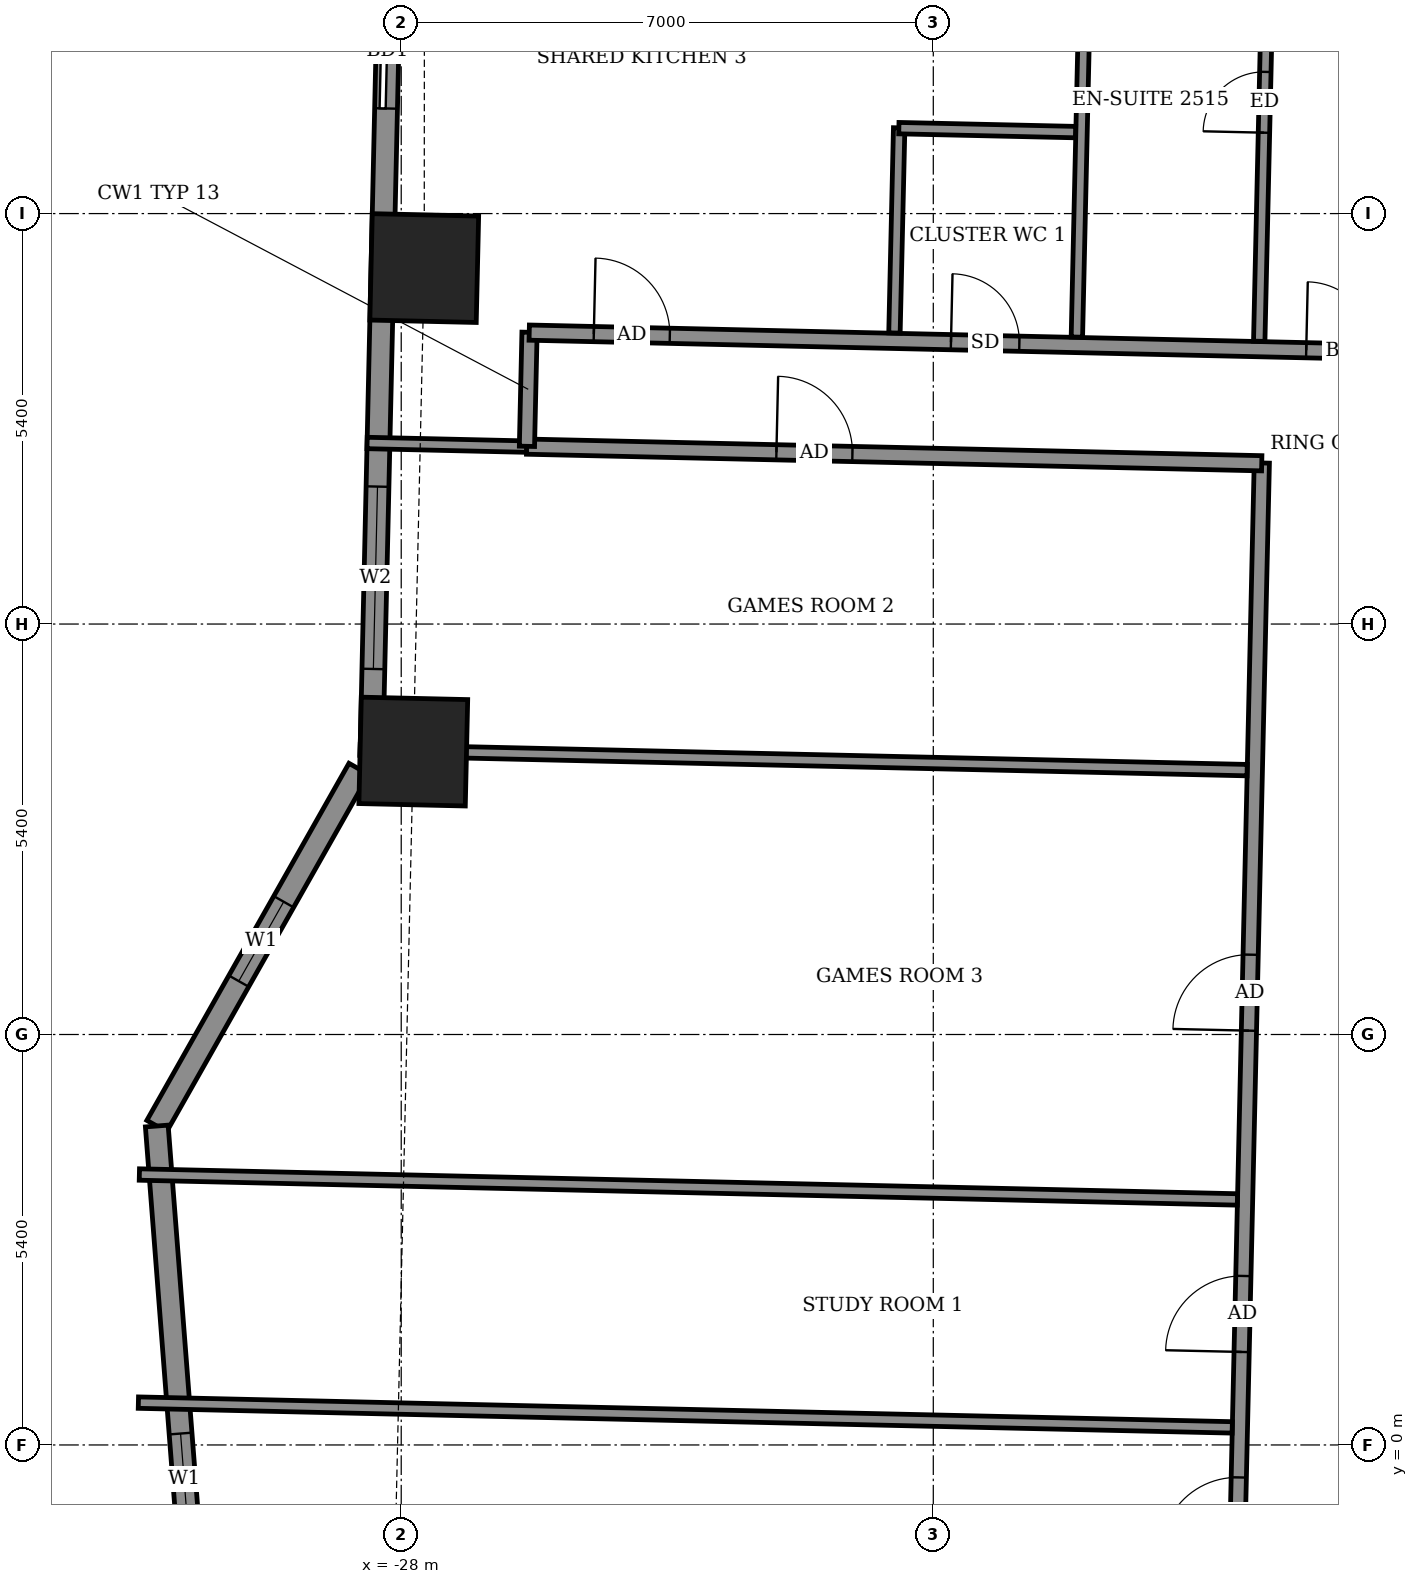
"""IFC4 building model, lengths in metres.
Left out: names, types, materials, properties, quantities, classifications, styles, units other than length and angle.
Written with IfcOpenShell. Run it as: python <this file> out.ifc"""

import sys

from ifc_helpers import new_model, si_unit, direction, frame, frame_2d, origin, origin_2d, place, context, subcontext, project, spatial, rectangle, extrude, element, fill, save


model = new_model("IFC4")
c1 = context("Model", 3, precision=1e-05, world=origin(), true_north=direction((0.0, 1.0)))
c2 = subcontext(c1, "Body", "Model", "MODEL_VIEW")
j1 = project(units=[si_unit("LENGTHUNIT", "METRE"), si_unit("PLANEANGLEUNIT", "RADIAN")], contexts=[c1])
p1 = place(None, origin())
s1 = spatial("IfcSite", under=j1, at=p1, CompositionType="ELEMENT")
p2 = place(p1, origin())
s2 = spatial("IfcBuilding", under=s1, at=p2, CompositionType="ELEMENT")
p3 = place(p2, frame((0.0, 0.0, 101.9)))
s3 = spatial("IfcBuildingStorey", under=s2, at=p3, CompositionType="ELEMENT", Elevation=101.9)
for number, where, z_axis, x_axis in (
    (1, (-27.697, 15.483, -0.55), (0.0, 0.0, 1.0), (-0.023, -1.0, 0.0)),
    (2, (-27.841, 9.122, -0.55), (0.0, 0.0, 1.0), (-0.023, -1.0, 0.0)),
):
    element("IfcColumn", number, at=place(p3, frame(where, z_axis=z_axis, x_axis=x_axis)), inside=s3, PredefinedType="COLUMN", context=c2, shape_type="SweptSolid", body=[
        extrude(rectangle(XDim=1.4, YDim=1.4, at=origin_2d()), origin(), (0.0, 0.0, 1.0), 3.6),
    ])
p4 = place(p3, frame((-28.106, 21.707, 0.0), z_axis=(0.0, 0.0, 1.0), x_axis=(-0.022654663697, -0.999743350172, 0.0)))
e3 = element("IfcWall", 3, at=p4, inside=s3, PredefinedType="SOLIDWALL", context=c2, shape_type="SweptSolid", body=[
    extrude(rectangle(XDim=12.63, YDim=0.3, at=frame_2d((6.315, 0.0))), origin(), (0.0, 0.0, 1.0), 3.05),
])
p5 = place(p4, frame((2.625, 0.0, 0.0)))
e4 = element("IfcOpeningElement", 4, at=p5, cuts=e3, PredefinedType="OPENING", context=c2, shape_type="SweptSolid", body=[
    extrude(rectangle(XDim=1.5, YDim=2.4, at=frame_2d((0.75, 1.2))), frame((0.0, 0.16, 0.0), z_axis=(0.0, -1.0, 0.0), x_axis=(1.0, 0.0, 0.0)), (0.0, 0.0, 1.0), 0.32),
])
p6 = place(p4, frame((9.101, 0.0, 0.9)))
e5 = element("IfcOpeningElement", 5, at=p6, cuts=e3, PredefinedType="OPENING", context=c2, shape_type="SweptSolid", body=[
    extrude(rectangle(XDim=2.4, YDim=1.5, at=frame_2d((1.2, 0.75))), frame((0.0, 0.16, 0.0), z_axis=(0.0, -1.0, 0.0), x_axis=(1.0, 0.0, 0.0)), (0.0, 0.0, 1.0), 0.32),
])
p7 = place(p3, frame((-28.557, 8.894, 0.0), z_axis=(0.0, 0.0, 1.0), x_axis=(-0.492589172415, -0.8702619762, 0.0)))
e6 = element("IfcWall", 6, at=p7, inside=s3, PredefinedType="SOLIDWALL", context=c2, shape_type="SweptSolid", body=[
    extrude(rectangle(XDim=5.398, YDim=0.3, at=frame_2d((2.699, 0.0))), origin(), (0.0, 0.0, 1.0), 3.05),
])
p8 = place(p7, frame((2.008, 0.0, 0.9)))
e7 = element("IfcOpeningElement", 7, at=p8, cuts=e6, PredefinedType="OPENING", context=c2, shape_type="SweptSolid", body=[
    extrude(rectangle(XDim=1.2, YDim=1.5, at=frame_2d((0.6, 0.75))), frame((0.0, 0.16, 0.0), z_axis=(0.0, -1.0, 0.0), x_axis=(1.0, 0.0, 0.0)), (0.0, 0.0, 1.0), 0.32),
])
p9 = place(p3, frame((-31.216, 4.196, 0.0), z_axis=(0.0, 0.0, 1.0), x_axis=(0.077178825362, -0.997017266107, 0.0)))
e8 = element("IfcWall", 8, at=p9, inside=s3, PredefinedType="SOLIDWALL", context=c2, shape_type="SweptSolid", body=[
    extrude(rectangle(XDim=5.574, YDim=0.3, at=frame_2d((2.787, 0.0))), origin(), (0.0, 0.0, 1.0), 3.05),
])
p10 = place(p9, frame((4.058, 0.0, 0.9)))
e9 = element("IfcOpeningElement", 9, at=p10, cuts=e8, PredefinedType="OPENING", context=c2, shape_type="SweptSolid", body=[
    extrude(rectangle(XDim=1.2, YDim=1.5, at=frame_2d((0.6, 0.75))), frame((0.0, 0.16, 0.0), z_axis=(0.0, -1.0, 0.0), x_axis=(1.0, 0.0, 0.0)), (0.0, 0.0, 1.0), 0.32),
])
p11 = place(p3, frame((-31.15, 9.448, 0.0), z_axis=(0.0, 0.0, 1.0), x_axis=(0.022681332769, 0.999742745482, 0.0)))
e10 = element("IfcWall", 10, at=p11, inside=s3, PredefinedType="USERDEFINED", context=c2, shape_type="SweptSolid", body=[
    extrude(rectangle(XDim=3.875, YDim=0.55, at=frame_2d((1.938, 0.0))), origin(), (0.0, 0.0, 1.0), 0.8),
])
p12 = place(p3, frame((-17.247, -12.149, 0.0), z_axis=(0.0, 0.0, 1.0), x_axis=(0.022696191528, 0.999742408268, 0.0)))
e11 = element("IfcWall", 11, at=p12, inside=s3, PredefinedType="PARTITIONING", context=c2, shape_type="SweptSolid", body=[
    extrude(rectangle(XDim=25.074, YDim=0.2, at=frame_2d((12.537, 0.0))), origin(), (0.0, 0.0, 1.0), 3.05),
])
p13 = place(p12, frame((17.604, 0.0, 0.0)))
e12 = element("IfcOpeningElement", 12, at=p13, cuts=e11, PredefinedType="OPENING", context=c2, shape_type="SweptSolid", body=[
    extrude(rectangle(XDim=1.0, YDim=2.1, at=frame_2d((0.5, 1.05))), frame((0.0, 0.11, 0.0), z_axis=(0.0, -1.0, 0.0), x_axis=(1.0, 0.0, 0.0)), (0.0, 0.0, 1.0), 0.22),
])
p14 = place(p12, frame((13.376, 0.0, 0.0)))
e13 = element("IfcOpeningElement", 13, at=p14, cuts=e11, PredefinedType="OPENING", context=c2, shape_type="SweptSolid", body=[
    extrude(rectangle(XDim=1.0, YDim=2.1, at=frame_2d((0.5, 1.05))), frame((0.0, 0.11, 0.0), z_axis=(0.0, -1.0, 0.0), x_axis=(1.0, 0.0, 0.0)), (0.0, 0.0, 1.0), 0.22),
])
p15 = place(p12, frame((10.725, 0.0, 0.0)))
e14 = element("IfcOpeningElement", 14, at=p15, cuts=e11, PredefinedType="OPENING", context=c2, shape_type="SweptSolid", body=[
    extrude(rectangle(XDim=1.0, YDim=2.1, at=frame_2d((0.5, 1.05))), frame((0.0, 0.11, 0.0), z_axis=(0.0, -1.0, 0.0), x_axis=(1.0, 0.0, 0.0)), (0.0, 0.0, 1.0), 0.22),
])
p16 = place(p12, frame((8.225, 0.0, 0.0)))
e15 = element("IfcOpeningElement", 15, at=p16, cuts=e11, PredefinedType="OPENING", context=c2, shape_type="SweptSolid", body=[
    extrude(rectangle(XDim=0.9, YDim=2.1, at=frame_2d((0.45, 1.05))), frame((0.0, 0.11, 0.0), z_axis=(0.0, -1.0, 0.0), x_axis=(1.0, 0.0, 0.0)), (0.0, 0.0, 1.0), 0.22),
])
p17 = place(p12, frame((5.262, 0.0, 0.0)))
e16 = element("IfcOpeningElement", 16, at=p17, cuts=e11, PredefinedType="OPENING", context=c2, shape_type="SweptSolid", body=[
    extrude(rectangle(XDim=1.0, YDim=2.1, at=frame_2d((0.5, 1.05))), frame((0.0, 0.11, 0.0), z_axis=(0.0, -1.0, 0.0), x_axis=(1.0, 0.0, 0.0)), (0.0, 0.0, 1.0), 0.22),
])
p18 = place(p3, frame((-31.458, 0.557, 0.0), z_axis=(0.0, 0.0, 1.0), x_axis=(0.999743636126, -0.022642041092, 0.0)))
e17 = element("IfcWall", 17, at=p18, inside=s3, PredefinedType="PARTITIONING", context=c2, shape_type="SweptSolid", body=[
    extrude(rectangle(XDim=14.395, YDim=0.15, at=frame_2d((7.197, 0.0))), origin(), (0.0, 0.0, 1.0), 2.1),
])
p19 = place(p3, frame((-31.445, 3.558, 0.0), z_axis=(0.0, 0.0, 1.0), x_axis=(0.999742140748, -0.022707972439, 0.0)))
e18 = element("IfcWall", 18, at=p19, inside=s3, PredefinedType="PARTITIONING", context=c2, shape_type="SweptSolid", body=[
    extrude(rectangle(XDim=14.45, YDim=0.15, at=frame_2d((7.225, 0.0))), origin(), (0.0, 0.0, 1.0), 2.1),
])
p20 = place(p3, frame((-28.541, 9.143, 0.0), z_axis=(0.0, 0.0, 1.0), x_axis=(0.999742008279, -0.022713803786, 0.0)))
e19 = element("IfcWall", 19, at=p20, inside=s3, PredefinedType="PARTITIONING", context=c2, shape_type="SweptSolid", body=[
    extrude(rectangle(XDim=11.673, YDim=0.15, at=frame_2d((5.836, 0.0))), origin(), (0.0, 0.0, 1.0), 3.05),
])
p21 = place(p3, frame((-28.449, 13.182, 0.0), z_axis=(0.0, 0.0, 1.0), x_axis=(0.999741236023, -0.022747769011, 0.0)))
e20 = element("IfcWall", 20, at=p21, inside=s3, PredefinedType="PARTITIONING", context=c2, shape_type="SweptSolid", body=[
    extrude(rectangle(XDim=2.104, YDim=0.15, at=frame_2d((1.052, 0.0))), origin(), (0.0, 0.0, 1.0), 2.55),
])
p22 = place(p3, frame((-26.35, 13.134, 0.0), z_axis=(0.0, 0.0, 1.0), x_axis=(0.999743721339, -0.022638278294, 0.0)))
e21 = element("IfcWall", 21, at=p22, inside=s3, PredefinedType="PARTITIONING", context=c2, shape_type="SweptSolid", body=[
    extrude(rectangle(XDim=9.674, YDim=0.2, at=frame_2d((4.837, 0.0))), origin(), (0.0, 0.0, 1.0), 3.05),
])
p23 = place(p22, frame((3.287, 0.0, 0.0)))
e22 = element("IfcOpeningElement", 22, at=p23, cuts=e21, PredefinedType="OPENING", context=c2, shape_type="SweptSolid", body=[
    extrude(rectangle(XDim=1.0, YDim=2.1, at=frame_2d((0.5, 1.05))), frame((0.0, 0.11, 0.0), z_axis=(0.0, -1.0, 0.0), x_axis=(1.0, 0.0, 0.0)), (0.0, 0.0, 1.0), 0.22),
])
p24 = place(p3, frame((-26.346, 13.138, 0.0), z_axis=(0.0, 0.0, 1.0), x_axis=(0.022617910375, 0.999744182344, 0.0)))
e23 = element("IfcWall", 23, at=p24, inside=s3, PredefinedType="PARTITIONING", context=c2, shape_type="SweptSolid", body=[
    extrude(rectangle(XDim=1.5, YDim=0.2, at=frame_2d((0.75, 0.0))), origin(), (0.0, 0.0, 1.0), 3.05),
])
p25 = place(p3, frame((-26.316, 14.634, 0.0), z_axis=(0.0, 0.0, 1.0), x_axis=(0.999742734556, -0.02268181435, 0.0)))
e24 = element("IfcWall", 24, at=p25, inside=s3, PredefinedType="PARTITIONING", context=c2, shape_type="SweptSolid", body=[
    extrude(rectangle(XDim=50.708, YDim=0.2, at=frame_2d((25.354, 0.0))), origin(), (0.0, 0.0, 1.0), 3.05),
])
p26 = place(p25, frame((48.229, 0.0, 0.0)))
e25 = element("IfcOpeningElement", 25, at=p26, cuts=e24, PredefinedType="OPENING", context=c2, shape_type="SweptSolid", body=[
    extrude(rectangle(XDim=1.0, YDim=2.1, at=frame_2d((0.5, 1.05))), frame((0.0, 0.11, 0.0), z_axis=(0.0, -1.0, 0.0), x_axis=(1.0, 0.0, 0.0)), (0.0, 0.0, 1.0), 0.22),
])
p27 = place(p25, frame((43.6, 0.0, 0.0)))
e26 = element("IfcOpeningElement", 26, at=p27, cuts=e24, PredefinedType="OPENING", context=c2, shape_type="SweptSolid", body=[
    extrude(rectangle(XDim=0.9, YDim=2.1, at=frame_2d((0.45, 1.05))), frame((0.0, 0.11, 0.0), z_axis=(0.0, -1.0, 0.0), x_axis=(1.0, 0.0, 0.0)), (0.0, 0.0, 1.0), 0.22),
])
p28 = place(p25, frame((38.925, 0.0, 0.0)))
e27 = element("IfcOpeningElement", 27, at=p28, cuts=e24, PredefinedType="OPENING", context=c2, shape_type="SweptSolid", body=[
    extrude(rectangle(XDim=0.9, YDim=2.1, at=frame_2d((0.45, 1.05))), frame((0.0, 0.11, 0.0), z_axis=(0.0, -1.0, 0.0), x_axis=(1.0, 0.0, 0.0)), (0.0, 0.0, 1.0), 0.22),
])
p29 = place(p25, frame((36.9, 0.0, 0.0)))
e28 = element("IfcOpeningElement", 28, at=p29, cuts=e24, PredefinedType="OPENING", context=c2, shape_type="SweptSolid", body=[
    extrude(rectangle(XDim=0.9, YDim=2.1, at=frame_2d((0.45, 1.05))), frame((0.0, 0.11, 0.0), z_axis=(0.0, -1.0, 0.0), x_axis=(1.0, 0.0, 0.0)), (0.0, 0.0, 1.0), 0.22),
])
p30 = place(p25, frame((29.975, 0.0, 0.0)))
e29 = element("IfcOpeningElement", 29, at=p30, cuts=e24, PredefinedType="OPENING", context=c2, shape_type="SweptSolid", body=[
    extrude(rectangle(XDim=0.9, YDim=2.1, at=frame_2d((0.45, 1.05))), frame((0.0, 0.11, 0.0), z_axis=(0.0, -1.0, 0.0), x_axis=(1.0, 0.0, 0.0)), (0.0, 0.0, 1.0), 0.22),
])
p31 = place(p25, frame((27.9, 0.0, 0.0)))
e30 = element("IfcOpeningElement", 30, at=p31, cuts=e24, PredefinedType="OPENING", context=c2, shape_type="SweptSolid", body=[
    extrude(rectangle(XDim=0.9, YDim=2.1, at=frame_2d((0.45, 1.05))), frame((0.0, 0.11, 0.0), z_axis=(0.0, -1.0, 0.0), x_axis=(1.0, 0.0, 0.0)), (0.0, 0.0, 1.0), 0.22),
])
p32 = place(p25, frame((21.175, 0.0, 0.0)))
e31 = element("IfcOpeningElement", 31, at=p32, cuts=e24, PredefinedType="OPENING", context=c2, shape_type="SweptSolid", body=[
    extrude(rectangle(XDim=0.9, YDim=2.1, at=frame_2d((0.45, 1.05))), frame((0.0, 0.11, 0.0), z_axis=(0.0, -1.0, 0.0), x_axis=(1.0, 0.0, 0.0)), (0.0, 0.0, 1.0), 0.22),
])
p33 = place(p25, frame((19.25, 0.0, 0.0)))
e32 = element("IfcOpeningElement", 32, at=p33, cuts=e24, PredefinedType="OPENING", context=c2, shape_type="SweptSolid", body=[
    extrude(rectangle(XDim=0.9, YDim=2.1, at=frame_2d((0.45, 1.05))), frame((0.0, 0.11, 0.0), z_axis=(0.0, -1.0, 0.0), x_axis=(1.0, 0.0, 0.0)), (0.0, 0.0, 1.0), 0.22),
])
p34 = place(p25, frame((12.375, 0.0, 0.0)))
e33 = element("IfcOpeningElement", 33, at=p34, cuts=e24, PredefinedType="OPENING", context=c2, shape_type="SweptSolid", body=[
    extrude(rectangle(XDim=0.9, YDim=2.1, at=frame_2d((0.45, 1.05))), frame((0.0, 0.11, 0.0), z_axis=(0.0, -1.0, 0.0), x_axis=(1.0, 0.0, 0.0)), (0.0, 0.0, 1.0), 0.22),
])
p35 = place(p25, frame((10.225, 0.0, 0.0)))
e34 = element("IfcOpeningElement", 34, at=p35, cuts=e24, PredefinedType="OPENING", context=c2, shape_type="SweptSolid", body=[
    extrude(rectangle(XDim=0.9, YDim=2.1, at=frame_2d((0.45, 1.05))), frame((0.0, 0.11, 0.0), z_axis=(0.0, -1.0, 0.0), x_axis=(1.0, 0.0, 0.0)), (0.0, 0.0, 1.0), 0.22),
])
p36 = place(p25, frame((0.85, 0.0, 0.0)))
e35 = element("IfcOpeningElement", 35, at=p36, cuts=e24, PredefinedType="OPENING", context=c2, shape_type="SweptSolid", body=[
    extrude(rectangle(XDim=1.0, YDim=2.1, at=frame_2d((0.5, 1.05))), frame((0.0, 0.11, 0.0), z_axis=(0.0, -1.0, 0.0), x_axis=(1.0, 0.0, 0.0)), (0.0, 0.0, 1.0), 0.22),
])
p37 = place(p25, frame((5.55, 0.0, 0.0)))
e36 = element("IfcOpeningElement", 36, at=p37, cuts=e24, PredefinedType="OPENING", context=c2, shape_type="SweptSolid", body=[
    extrude(rectangle(XDim=0.9, YDim=2.1, at=frame_2d((0.45, 1.05))), frame((0.0, 0.11, 0.0), z_axis=(0.0, -1.0, 0.0), x_axis=(1.0, 0.0, 0.0)), (0.0, 0.0, 1.0), 0.22),
])
p38 = place(p3, frame((-21.511, 14.629, 0.0), z_axis=(0.0, 0.0, 1.0), x_axis=(0.022969966847, 0.999736155505, 0.0)))
e37 = element("IfcWall", 37, at=p38, inside=s3, PredefinedType="PARTITIONING", context=c2, shape_type="SweptSolid", body=[
    extrude(rectangle(XDim=2.7, YDim=0.15, at=frame_2d((1.35, 0.0))), origin(), (0.0, 0.0, 1.0), 3.05),
])
p39 = place(p3, frame((-19.111, 14.575, 0.0), z_axis=(0.0, 0.0, 1.0), x_axis=(0.022684355347, 0.999742676904, 0.0)))
e38 = element("IfcWall", 38, at=p39, inside=s3, PredefinedType="PARTITIONING", context=c2, shape_type="SweptSolid", body=[
    extrude(rectangle(XDim=11.376, YDim=0.15, at=frame_2d((5.688, 0.0))), origin(), (0.0, 0.0, 1.0), 2.55),
])
p40 = place(p3, frame((-16.712, 14.52, 0.0), z_axis=(0.0, 0.0, 1.0), x_axis=(0.022692767652, 0.999742485991, 0.0)))
e39 = element("IfcWall", 39, at=p40, inside=s3, PredefinedType="PARTITIONING", context=c2, shape_type="SweptSolid", body=[
    extrude(rectangle(XDim=6.391, YDim=0.15, at=frame_2d((3.195, 0.0))), origin(), (0.0, 0.0, 1.0), 3.05),
])
p41 = place(p40, frame((2.745, 0.0, 0.0)))
e40 = element("IfcOpeningElement", 40, at=p41, cuts=e39, PredefinedType="OPENING", context=c2, shape_type="SweptSolid", body=[
    extrude(rectangle(XDim=0.8, YDim=2.1, at=frame_2d((0.4, 1.05))), frame((0.0, 0.085, 0.0), z_axis=(0.0, -1.0, 0.0), x_axis=(1.0, 0.0, 0.0)), (0.0, 0.0, 1.0), 0.17),
])
p42 = place(p3, frame((-21.453, 17.324, 0.0), z_axis=(0.0, 0.0, 1.0), x_axis=(0.999749744571, -0.022370700241, 0.0)))
e41 = element("IfcWall", 41, at=p42, inside=s3, PredefinedType="PARTITIONING", context=c2, shape_type="SweptSolid", body=[
    extrude(rectangle(XDim=2.324, YDim=0.15, at=frame_2d((1.162, 0.0))), origin(), (0.0, 0.0, 1.0), 3.05),
])
p43 = place(p5, origin())
e42 = element("IfcDoor", 42, at=p43, inside=s3, OperationType="SLIDING_TO_LEFT", PredefinedType="DOOR", context=c2, shape_type="SweptSolid", body=[
    extrude(rectangle(XDim=1.5, YDim=2.4, at=frame_2d((0.75, 1.2))), frame((0.0, 0.025, 0.0), z_axis=(0.0, -1.0, 0.0), x_axis=(1.0, 0.0, 0.0)), (0.0, 0.0, 1.0), 0.05),
])
fill(e4, e42)
p44 = place(p6, origin())
e43 = element("IfcWindow", 43, at=p44, inside=s3, PartitioningType="DOUBLE_PANEL_VERTICAL", PredefinedType="WINDOW", context=c2, shape_type="SweptSolid", body=[
    extrude(rectangle(XDim=2.4, YDim=1.5, at=frame_2d((1.2, 0.75))), frame((0.0, 0.03, 0.0), z_axis=(0.0, -1.0, 0.0), x_axis=(1.0, 0.0, 0.0)), (0.0, 0.0, 1.0), 0.06),
])
fill(e5, e43)
p45 = place(p8, origin())
e44 = element("IfcWindow", 44, at=p45, inside=s3, PartitioningType="SINGLE_PANEL", PredefinedType="WINDOW", context=c2, shape_type="SweptSolid", body=[
    extrude(rectangle(XDim=1.2, YDim=1.5, at=frame_2d((0.6, 0.75))), frame((0.0, 0.03, 0.0), z_axis=(0.0, -1.0, 0.0), x_axis=(1.0, 0.0, 0.0)), (0.0, 0.0, 1.0), 0.06),
])
fill(e7, e44)
p46 = place(p10, origin())
e45 = element("IfcWindow", 45, at=p46, inside=s3, PartitioningType="SINGLE_PANEL", PredefinedType="WINDOW", context=c2, shape_type="SweptSolid", body=[
    extrude(rectangle(XDim=1.2, YDim=1.5, at=frame_2d((0.6, 0.75))), frame((0.0, 0.03, 0.0), z_axis=(0.0, -1.0, 0.0), x_axis=(1.0, 0.0, 0.0)), (0.0, 0.0, 1.0), 0.06),
])
fill(e9, e45)
p47 = place(p35, origin())
e46 = element("IfcDoor", 46, at=p47, inside=s3, OperationType="SINGLE_SWING_LEFT", PredefinedType="DOOR", context=c2, shape_type="SweptSolid", body=[
    extrude(rectangle(XDim=0.9, YDim=2.1, at=frame_2d((0.45, 1.05))), frame((0.0, 0.025, 0.0), z_axis=(0.0, -1.0, 0.0), x_axis=(1.0, 0.0, 0.0)), (0.0, 0.0, 1.0), 0.05),
])
fill(e34, e46)
p48 = place(p41, origin())
e47 = element("IfcDoor", 47, at=p48, inside=s3, OperationType="SINGLE_SWING_LEFT", PredefinedType="DOOR", context=c2, shape_type="SweptSolid", body=[
    extrude(rectangle(XDim=0.8, YDim=2.1, at=frame_2d((0.4, 1.05))), frame((0.0, 0.025, 0.0), z_axis=(0.0, -1.0, 0.0), x_axis=(1.0, 0.0, 0.0)), (0.0, 0.0, 1.0), 0.05),
])
fill(e40, e47)
p49 = place(p36, origin())
e48 = element("IfcDoor", 48, at=p49, inside=s3, OperationType="SINGLE_SWING_RIGHT", PredefinedType="DOOR", context=c2, shape_type="SweptSolid", body=[
    extrude(rectangle(XDim=1.0, YDim=2.1, at=frame_2d((0.5, 1.05))), frame((0.0, 0.025, 0.0), z_axis=(0.0, -1.0, 0.0), x_axis=(1.0, 0.0, 0.0)), (0.0, 0.0, 1.0), 0.05),
])
fill(e35, e48)
p50 = place(p37, origin())
e49 = element("IfcDoor", 49, at=p50, inside=s3, OperationType="SINGLE_SWING_LEFT", PredefinedType="DOOR", context=c2, shape_type="SweptSolid", body=[
    extrude(rectangle(XDim=0.9, YDim=2.1, at=frame_2d((0.45, 1.05))), frame((0.0, 0.025, 0.0), z_axis=(0.0, -1.0, 0.0), x_axis=(1.0, 0.0, 0.0)), (0.0, 0.0, 1.0), 0.05),
])
fill(e36, e49)
p51 = place(p23, origin())
e50 = element("IfcDoor", 50, at=p51, inside=s3, OperationType="SINGLE_SWING_LEFT", PredefinedType="DOOR", context=c2, shape_type="SweptSolid", body=[
    extrude(rectangle(XDim=1.0, YDim=2.1, at=frame_2d((0.5, 1.05))), frame((0.0, 0.025, 0.0), z_axis=(0.0, -1.0, 0.0), x_axis=(1.0, 0.0, 0.0)), (0.0, 0.0, 1.0), 0.05),
])
fill(e22, e50)
p52 = place(p13, origin())
e51 = element("IfcDoor", 51, at=p52, inside=s3, OperationType="SINGLE_SWING_RIGHT", PredefinedType="DOOR", context=c2, shape_type="SweptSolid", body=[
    extrude(rectangle(XDim=1.0, YDim=2.1, at=frame_2d((0.5, 1.05))), frame((0.0, 0.025, 0.0), z_axis=(0.0, -1.0, 0.0), x_axis=(1.0, 0.0, 0.0)), (0.0, 0.0, 1.0), 0.05),
])
fill(e12, e51)
p53 = place(p14, origin())
e52 = element("IfcDoor", 52, at=p53, inside=s3, OperationType="SINGLE_SWING_LEFT", PredefinedType="DOOR", context=c2, shape_type="SweptSolid", body=[
    extrude(rectangle(XDim=1.0, YDim=2.1, at=frame_2d((0.5, 1.05))), frame((0.0, 0.025, 0.0), z_axis=(0.0, -1.0, 0.0), x_axis=(1.0, 0.0, 0.0)), (0.0, 0.0, 1.0), 0.05),
])
fill(e13, e52)
p54 = place(p15, origin())
e53 = element("IfcDoor", 53, at=p54, inside=s3, OperationType="SINGLE_SWING_RIGHT", PredefinedType="DOOR", context=c2, shape_type="SweptSolid", body=[
    extrude(rectangle(XDim=1.0, YDim=2.1, at=frame_2d((0.5, 1.05))), frame((0.0, 0.025, 0.0), z_axis=(0.0, -1.0, 0.0), x_axis=(1.0, 0.0, 0.0)), (0.0, 0.0, 1.0), 0.05),
])
fill(e14, e53)
save(model, sys.argv[1])
